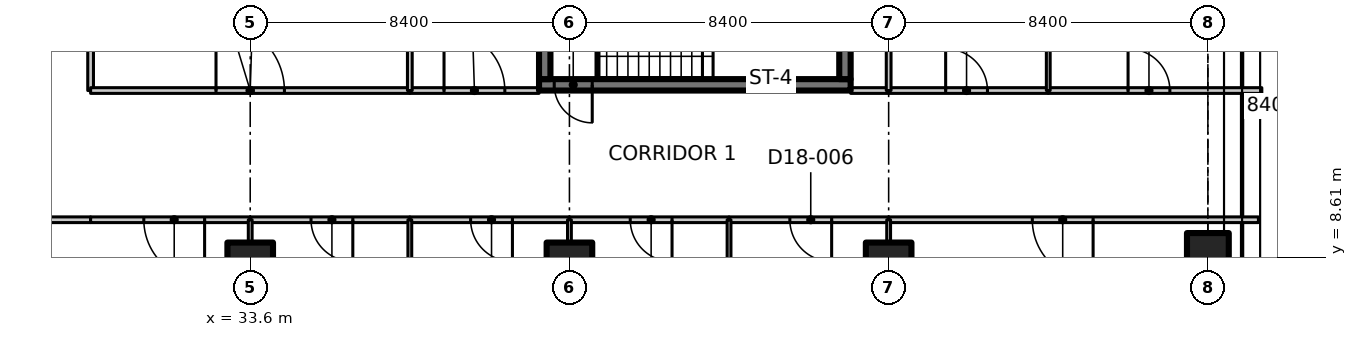
"""IFC4 building model, lengths in metres.
Left out: names, types, materials, properties, quantities, classifications, styles, units other than length and angle.
Written with IfcOpenShell. Run it as: python <this file> out.ifc"""

import sys

from ifc_helpers import new_model, si_unit, direction, frame, frame_2d, origin, origin_2d, place, context, subcontext, project, spatial, polyline, rectangle, outline, extrude, element, fill, save


model = new_model("IFC4")
c1 = context("Model", 3, precision=1e-05, world=origin(), true_north=direction((0.0, 1.0)))
c2 = subcontext(c1, "Body", "Model", "MODEL_VIEW")
j1 = project(units=[si_unit("LENGTHUNIT", "METRE"), si_unit("PLANEANGLEUNIT", "RADIAN")], contexts=[c1])
p1 = place(None, origin())
s1 = spatial("IfcSite", under=j1, at=p1, CompositionType="ELEMENT")
p2 = place(p1, origin())
s2 = spatial("IfcBuilding", under=s1, at=p2, CompositionType="ELEMENT")
p3 = place(p2, frame((0.0, 0.0, 145.7)))
s3 = spatial("IfcBuildingStorey", under=s2, at=p3, CompositionType="ELEMENT", Elevation=145.7)
for number, where, z_axis, x_axis in (
    (1, (33.6, 8.4, 0.0), (0.0, 0.0, 1.0), (1.0, 0.0, 0.0)),
    (2, (42.0, 8.4, 0.0), (0.0, 0.0, 1.0), (1.0, 0.0, 0.0)),
    (3, (50.4, 8.4, 0.0), (0.0, 0.0, 1.0), (1.0, 0.0, 0.0)),
):
    element("IfcColumn", number, at=place(p3, frame(where, z_axis=z_axis, x_axis=x_axis)), inside=s3, PredefinedType="COLUMN", context=c2, shape_type="SweptSolid", body=[
        extrude(rectangle(XDim=1.2, YDim=1.2, at=origin_2d()), origin(), (0.0, 0.0, 1.0), 3.35),
    ])
p4 = place(p3, frame((58.8, 8.4, 0.0), z_axis=(0.0, 0.0, 1.0), x_axis=(1.0, 0.0, 0.0)))
e4 = element("IfcColumn", 4, at=p4, inside=s3, PredefinedType="COLUMN", context=c2, shape_type="SweptSolid", body=[
    extrude(rectangle(XDim=1.1, YDim=1.7, at=origin_2d()), origin(), (0.0, 0.0, 1.0), 3.35),
])
p5 = place(p3, frame((49.4, 13.15, 0.0), z_axis=(0.0, 0.0, 1.0), x_axis=(-1.0, 0.0, 0.0)))
e5 = element("IfcWall", 5, at=p5, inside=s3, PredefinedType="SHEAR", context=c2, shape_type="SweptSolid", body=[
    extrude(rectangle(XDim=8.2, YDim=0.3, at=frame_2d((4.1, 0.0))), origin(), (0.0, 0.0, 1.0), 3.35),
])
p6 = place(p5, frame((6.8, 0.0, 0.0)))
e6 = element("IfcOpeningElement", 6, at=p6, cuts=e5, PredefinedType="OPENING", context=c2, shape_type="SweptSolid", body=[
    extrude(rectangle(XDim=1.0, YDim=2.1, at=frame_2d((0.5, 1.05))), frame((0.0, 0.16, 0.0), z_axis=(0.0, -1.0, 0.0), x_axis=(1.0, 0.0, 0.0)), (0.0, 0.0, 1.0), 0.32),
])
for number, where, z_axis, x_axis in (
    (7, (41.35, 13.3, 0.0), (0.0, 0.0, 1.0), (0.0, 1.0, 0.0)),
    (8, (49.25, 13.3, 0.0), (0.0, 0.0, 1.0), (0.0, 1.0, 0.0)),
):
    element("IfcWall", number, at=place(p3, frame(where, z_axis=z_axis, x_axis=x_axis)), inside=s3, PredefinedType="SHEAR", context=c2, shape_type="SweptSolid", body=[
        extrude(rectangle(XDim=2.55, YDim=0.3, at=frame_2d((1.275, 0.0))), origin(), (0.0, 0.0, 1.0), 3.35),
    ])
p7 = place(p3, frame((29.4, 9.6, 0.0), z_axis=(0.0, 0.0, 1.0), x_axis=(-1.0, 0.0, 0.0)))
e9 = element("IfcWall", 9, at=p7, inside=s3, PredefinedType="PARTITIONING", context=c2, shape_type="SweptSolid", body=[
    extrude(rectangle(XDim=4.2, YDim=0.15, at=frame_2d((2.1, 0.0))), origin(), (0.0, 0.0, 1.0), 3.33),
])
p8 = place(p3, frame((29.4, 21.2, 0.0), z_axis=(0.0, 0.0, 1.0), x_axis=(0.0, -1.0, 0.0)))
e10 = element("IfcWall", 10, at=p8, inside=s3, PredefinedType="PARTITIONING", context=c2, shape_type="SweptSolid", body=[
    extrude(rectangle(XDim=8.2, YDim=0.15, at=frame_2d((4.1, 0.0))), origin(), (0.0, 0.0, 1.0), 3.33),
])
p9 = place(p3, frame((33.6, 9.6, 0.0), z_axis=(0.0, 0.0, 1.0), x_axis=(-1.0, 0.0, 0.0)))
e11 = element("IfcWall", 11, at=p9, inside=s3, PredefinedType="PARTITIONING", context=c2, shape_type="SweptSolid", body=[
    extrude(rectangle(XDim=4.2, YDim=0.15, at=frame_2d((2.1, 0.0))), origin(), (0.0, 0.0, 1.0), 3.33),
])
p10 = place(p9, frame((1.2, 0.0, 0.0)))
e12 = element("IfcOpeningElement", 12, at=p10, cuts=e11, PredefinedType="OPENING", context=c2, shape_type="SweptSolid", body=[
    extrude(rectangle(XDim=1.6, YDim=2.1, at=frame_2d((0.8, 1.05))), frame((0.0, 0.085, 0.0), z_axis=(0.0, -1.0, 0.0), x_axis=(1.0, 0.0, 0.0)), (0.0, 0.0, 1.0), 0.17),
])
p11 = place(p3, frame((37.8, 9.6, 0.0), z_axis=(0.0, 0.0, 1.0), x_axis=(-1.0, 0.0, 0.0)))
e13 = element("IfcWall", 13, at=p11, inside=s3, PredefinedType="PARTITIONING", context=c2, shape_type="SweptSolid", body=[
    extrude(rectangle(XDim=4.2, YDim=0.15, at=frame_2d((2.1, 0.0))), origin(), (0.0, 0.0, 1.0), 3.33),
])
p12 = place(p11, frame((1.5, 0.0, 0.0)))
e14 = element("IfcOpeningElement", 14, at=p12, cuts=e13, PredefinedType="OPENING", context=c2, shape_type="SweptSolid", body=[
    extrude(rectangle(XDim=1.1, YDim=2.1, at=frame_2d((0.55, 1.05))), frame((0.0, 0.085, 0.0), z_axis=(0.0, -1.0, 0.0), x_axis=(1.0, 0.0, 0.0)), (0.0, 0.0, 1.0), 0.17),
])
p13 = place(p3, frame((42.0, 9.6, 0.0), z_axis=(0.0, 0.0, 1.0), x_axis=(-1.0, 0.0, 0.0)))
e15 = element("IfcWall", 15, at=p13, inside=s3, PredefinedType="PARTITIONING", context=c2, shape_type="SweptSolid", body=[
    extrude(rectangle(XDim=4.2, YDim=0.15, at=frame_2d((2.1, 0.0))), origin(), (0.0, 0.0, 1.0), 3.33),
])
p14 = place(p13, frame((1.5, 0.0, 0.0)))
e16 = element("IfcOpeningElement", 16, at=p14, cuts=e15, PredefinedType="OPENING", context=c2, shape_type="SweptSolid", body=[
    extrude(rectangle(XDim=1.1, YDim=2.1, at=frame_2d((0.55, 1.05))), frame((0.0, 0.085, 0.0), z_axis=(0.0, -1.0, 0.0), x_axis=(1.0, 0.0, 0.0)), (0.0, 0.0, 1.0), 0.17),
])
p15 = place(p3, frame((46.2, 9.6, 0.0), z_axis=(0.0, 0.0, 1.0), x_axis=(-1.0, 0.0, 0.0)))
e17 = element("IfcWall", 17, at=p15, inside=s3, PredefinedType="PARTITIONING", context=c2, shape_type="SweptSolid", body=[
    extrude(rectangle(XDim=4.2, YDim=0.15, at=frame_2d((2.1, 0.0))), origin(), (0.0, 0.0, 1.0), 3.33),
])
p16 = place(p15, frame((1.5, 0.0, 0.0)))
e18 = element("IfcOpeningElement", 18, at=p16, cuts=e17, PredefinedType="OPENING", context=c2, shape_type="SweptSolid", body=[
    extrude(rectangle(XDim=1.1, YDim=2.1, at=frame_2d((0.55, 1.05))), frame((0.0, 0.085, 0.0), z_axis=(0.0, -1.0, 0.0), x_axis=(1.0, 0.0, 0.0)), (0.0, 0.0, 1.0), 0.17),
])
p17 = place(p3, frame((50.4, 9.6, 0.0), z_axis=(0.0, 0.0, 1.0), x_axis=(-1.0, 0.0, 0.0)))
e19 = element("IfcWall", 19, at=p17, inside=s3, PredefinedType="PARTITIONING", context=c2, shape_type="SweptSolid", body=[
    extrude(rectangle(XDim=4.2, YDim=0.15, at=frame_2d((2.1, 0.0))), origin(), (0.0, 0.0, 1.0), 3.33),
])
p18 = place(p17, frame((1.5, 0.0, 0.0)))
e20 = element("IfcOpeningElement", 20, at=p18, cuts=e19, PredefinedType="OPENING", context=c2, shape_type="SweptSolid", body=[
    extrude(rectangle(XDim=1.1, YDim=2.1, at=frame_2d((0.55, 1.05))), frame((0.0, 0.085, 0.0), z_axis=(0.0, -1.0, 0.0), x_axis=(1.0, 0.0, 0.0)), (0.0, 0.0, 1.0), 0.17),
])
p19 = place(p3, frame((60.131, 9.6, 0.0), z_axis=(0.0, 0.0, 1.0), x_axis=(-1.0, 0.0, 0.0)))
e21 = element("IfcWall", 21, at=p19, inside=s3, PredefinedType="PARTITIONING", context=c2, shape_type="SweptSolid", body=[
    extrude(outline(polyline([(0.0, 0.0), (9.731, 0.0), (9.73, 3.33), (1.781, 3.33), (1.779, 2.98), (0.883, 2.98), (0.881, 3.33), (0.25, 3.33), (0.0, 3.33), (0.0, 0.0)])), frame((0.0, 0.075, 0.0), z_axis=(0.0, -1.0, 0.0), x_axis=(1.0, 0.0, 0.0)), (0.0, 0.0, 1.0), 0.15),
])
p20 = place(p19, frame((4.351, 0.0, 0.0)))
e22 = element("IfcOpeningElement", 22, at=p20, cuts=e21, PredefinedType="OPENING", context=c2, shape_type="SweptSolid", body=[
    extrude(rectangle(XDim=1.6, YDim=2.1, at=frame_2d((0.8, 1.05))), frame((0.0, 0.085, 0.0), z_axis=(0.0, -1.0, 0.0), x_axis=(1.0, 0.0, 0.0)), (0.0, 0.0, 1.0), 0.17),
])
p21 = place(p3, frame((29.4, 13.0, 0.0), z_axis=(0.0, 0.0, 1.0), x_axis=(1.0, 0.0, 0.0)))
e23 = element("IfcWall", 23, at=p21, inside=s3, PredefinedType="PARTITIONING", context=c2, shape_type="SweptSolid", body=[
    extrude(rectangle(XDim=8.4, YDim=0.15, at=frame_2d((4.2, 0.0))), origin(), (0.0, 0.0, 1.0), 3.33),
])
p22 = place(p21, frame((3.3, 0.0, 0.0)))
e24 = element("IfcOpeningElement", 24, at=p22, cuts=e23, PredefinedType="OPENING", context=c2, shape_type="SweptSolid", body=[
    extrude(rectangle(XDim=1.8, YDim=2.1, at=frame_2d((0.9, 1.05))), frame((0.0, 0.085, 0.0), z_axis=(0.0, -1.0, 0.0), x_axis=(1.0, 0.0, 0.0)), (0.0, 0.0, 1.0), 0.17),
])
p23 = place(p3, frame((37.8, 13.0, 0.0), z_axis=(0.0, 0.0, 1.0), x_axis=(1.0, 0.0, 0.0)))
e25 = element("IfcWall", 25, at=p23, inside=s3, PredefinedType="PARTITIONING", context=c2, shape_type="SweptSolid", body=[
    extrude(rectangle(XDim=3.4, YDim=0.15, at=frame_2d((1.7, 0.0))), origin(), (0.0, 0.0, 1.0), 3.33),
])
p24 = place(p23, frame((0.9, 0.0, 0.0)))
e26 = element("IfcOpeningElement", 26, at=p24, cuts=e25, PredefinedType="OPENING", context=c2, shape_type="SweptSolid", body=[
    extrude(rectangle(XDim=1.6, YDim=2.1, at=frame_2d((0.8, 1.05))), frame((0.0, 0.085, 0.0), z_axis=(0.0, -1.0, 0.0), x_axis=(1.0, 0.0, 0.0)), (0.0, 0.0, 1.0), 0.17),
])
p25 = place(p3, frame((49.4, 13.0, 0.0), z_axis=(0.0, 0.0, 1.0), x_axis=(1.0, 0.0, 0.0)))
e27 = element("IfcWall", 27, at=p25, inside=s3, PredefinedType="PARTITIONING", context=c2, shape_type="SweptSolid", body=[
    extrude(rectangle(XDim=1.0, YDim=0.15, at=frame_2d((0.5, 0.0))), origin(), (0.0, 0.0, 1.0), 3.33),
])
p26 = place(p3, frame((50.4, 13.0, 0.0), z_axis=(0.0, 0.0, 1.0), x_axis=(1.0, 0.0, 0.0)))
e28 = element("IfcWall", 28, at=p26, inside=s3, PredefinedType="PARTITIONING", context=c2, shape_type="SweptSolid", body=[
    extrude(rectangle(XDim=4.2, YDim=0.15, at=frame_2d((2.1, 0.0))), origin(), (0.0, 0.0, 1.0), 3.33),
])
p27 = place(p26, frame((1.5, 0.0, 0.0)))
e29 = element("IfcOpeningElement", 29, at=p27, cuts=e28, PredefinedType="OPENING", context=c2, shape_type="SweptSolid", body=[
    extrude(rectangle(XDim=1.1, YDim=2.1, at=frame_2d((0.55, 1.05))), frame((0.0, 0.085, 0.0), z_axis=(0.0, -1.0, 0.0), x_axis=(1.0, 0.0, 0.0)), (0.0, 0.0, 1.0), 0.17),
])
p28 = place(p3, frame((54.6, 13.0, 0.0), z_axis=(0.0, 0.0, 1.0), x_axis=(1.0, 0.0, 0.0)))
e30 = element("IfcWall", 30, at=p28, inside=s3, PredefinedType="PARTITIONING", context=c2, shape_type="SweptSolid", body=[
    extrude(outline(polyline([(0.0, 0.0), (5.619, 0.0), (5.619, 3.33), (5.28, 3.33), (4.65, 3.33), (4.648, 2.98), (3.752, 2.98), (3.75, 3.33), (0.0, 3.33), (0.0, 0.0)])), frame((0.0, 0.075, 0.0), z_axis=(0.0, -1.0, 0.0), x_axis=(1.0, 0.0, 0.0)), (0.0, 0.0, 1.0), 0.15),
])
p29 = place(p28, frame((2.1, 0.0, 0.0)))
e31 = element("IfcOpeningElement", 31, at=p29, cuts=e30, PredefinedType="OPENING", context=c2, shape_type="SweptSolid", body=[
    extrude(rectangle(XDim=1.1, YDim=2.1, at=frame_2d((0.55, 1.05))), frame((0.0, 0.085, 0.0), z_axis=(0.0, -1.0, 0.0), x_axis=(1.0, 0.0, 0.0)), (0.0, 0.0, 1.0), 0.17),
])
p30 = place(p3, frame((33.6, 9.6, 0.0), z_axis=(0.0, 0.0, 1.0), x_axis=(0.0, -1.0, 0.0)))
e32 = element("IfcWall", 32, at=p30, inside=s3, PredefinedType="PARTITIONING", context=c2, shape_type="SweptSolid", body=[
    extrude(rectangle(XDim=0.58, YDim=0.1, at=frame_2d((0.29, 0.0))), origin(), (0.0, 0.0, 1.0), 3.33),
])
p31 = place(p3, frame((37.8, 9.6, 0.0), z_axis=(0.0, 0.0, 1.0), x_axis=(0.0, -1.0, 0.0)))
e33 = element("IfcWall", 33, at=p31, inside=s3, PredefinedType="PARTITIONING", context=c2, shape_type="SweptSolid", body=[
    extrude(outline(polyline([(0.0, 0.0), (10.965, 0.0), (10.965, 3.33), (10.7, 3.33), (10.05, 3.33), (10.048, 2.98), (9.152, 2.98), (9.15, 3.33), (0.0, 3.33), (0.0, 0.0)])), frame((0.0, 0.05, 0.0), z_axis=(0.0, -1.0, 0.0), x_axis=(1.0, 0.0, 0.0)), (0.0, 0.0, 1.0), 0.1),
])
p32 = place(p3, frame((42.0, 9.6, 0.0), z_axis=(0.0, 0.0, 1.0), x_axis=(0.0, -1.0, 0.0)))
e34 = element("IfcWall", 34, at=p32, inside=s3, PredefinedType="PARTITIONING", context=c2, shape_type="SweptSolid", body=[
    extrude(rectangle(XDim=0.58, YDim=0.1, at=frame_2d((0.29, 0.0))), origin(), (0.0, 0.0, 1.0), 3.33),
])
p33 = place(p3, frame((46.2, 9.6, 0.0), z_axis=(0.0, 0.0, 1.0), x_axis=(0.0, -1.0, 0.0)))
e35 = element("IfcWall", 35, at=p33, inside=s3, PredefinedType="PARTITIONING", context=c2, shape_type="SweptSolid", body=[
    extrude(outline(polyline([(0.0, 0.0), (10.965, 0.0), (10.965, 3.33), (10.7, 3.33), (10.05, 3.33), (10.048, 2.98), (9.152, 2.98), (9.15, 3.33), (0.0, 3.33), (0.0, 0.0)])), frame((0.0, 0.05, 0.0), z_axis=(0.0, -1.0, 0.0), x_axis=(1.0, 0.0, 0.0)), (0.0, 0.0, 1.0), 0.1),
])
p34 = place(p3, frame((50.4, 9.6, 0.0), z_axis=(0.0, 0.0, 1.0), x_axis=(0.0, -1.0, 0.0)))
e36 = element("IfcWall", 36, at=p34, inside=s3, PredefinedType="PARTITIONING", context=c2, shape_type="SweptSolid", body=[
    extrude(rectangle(XDim=0.58, YDim=0.1, at=frame_2d((0.29, 0.0))), origin(), (0.0, 0.0, 1.0), 3.33),
])
p35 = place(p3, frame((37.8, 30.243, 0.0), z_axis=(0.0, 0.0, 1.0), x_axis=(0.0, -1.0, 0.0)))
e37 = element("IfcWall", 37, at=p35, inside=s3, PredefinedType="PARTITIONING", context=c2, shape_type="SweptSolid", body=[
    extrude(outline(polyline([(0.0, 0.0), (17.243, 0.0), (17.243, 3.33), (5.493, 3.33), (5.491, 2.98), (4.595, 2.98), (4.593, 3.33), (0.0, 3.33), (0.0, 0.0)])), frame((0.0, 0.062, 0.0), z_axis=(0.0, -1.0, 0.0), x_axis=(1.0, 0.0, 0.0)), (0.0, 0.0, 1.0), 0.125),
])
p36 = place(p3, frame((50.4, 16.18, 0.0), z_axis=(0.0, 0.0, 1.0), x_axis=(0.0, -1.0, 0.0)))
e38 = element("IfcWall", 38, at=p36, inside=s3, PredefinedType="PARTITIONING", context=c2, shape_type="SweptSolid", body=[
    extrude(rectangle(XDim=3.18, YDim=0.125, at=frame_2d((1.59, 0.0))), origin(), (0.0, 0.0, 1.0), 3.33),
])
p37 = place(p3, frame((54.6, 25.502, 0.0), z_axis=(0.0, 0.0, 1.0), x_axis=(0.0, -1.0, 0.0)))
e39 = element("IfcWall", 39, at=p37, inside=s3, PredefinedType="PARTITIONING", context=c2, shape_type="SweptSolid", body=[
    extrude(outline(polyline([(0.0, 0.0), (12.502, 0.0), (12.502, 3.33), (5.168, 3.33), (5.166, 2.98), (3.839, 2.98), (3.837, 3.33), (0.103, 3.33), (0.0, 3.33), (0.0, 0.0)])), frame((0.0, 0.05, 0.0), z_axis=(0.0, -1.0, 0.0), x_axis=(1.0, 0.0, 0.0)), (0.0, 0.0, 1.0), 0.1),
])
p38 = place(p6, origin())
e40 = element("IfcDoor", 40, at=p38, inside=s3, OperationType="SINGLE_SWING_LEFT", PredefinedType="DOOR", context=c2, shape_type="SweptSolid", body=[
    extrude(rectangle(XDim=1.0, YDim=2.1, at=frame_2d((0.5, 1.05))), frame((0.0, 0.025, 0.0), z_axis=(0.0, -1.0, 0.0), x_axis=(1.0, 0.0, 0.0)), (0.0, 0.0, 1.0), 0.05),
])
fill(e6, e40)
p39 = place(p10, origin())
e41 = element("IfcDoor", 41, at=p39, inside=s3, OperationType="DOUBLE_DOOR_SINGLE_SWING", PredefinedType="DOOR", context=c2, shape_type="SweptSolid", body=[
    extrude(rectangle(XDim=1.6, YDim=2.1, at=frame_2d((0.8, 1.05))), frame((0.0, 0.025, 0.0), z_axis=(0.0, -1.0, 0.0), x_axis=(1.0, 0.0, 0.0)), (0.0, 0.0, 1.0), 0.05),
])
fill(e12, e41)
p40 = place(p12, origin())
e42 = element("IfcDoor", 42, at=p40, inside=s3, OperationType="SINGLE_SWING_LEFT", PredefinedType="DOOR", context=c2, shape_type="SweptSolid", body=[
    extrude(rectangle(XDim=1.1, YDim=2.1, at=frame_2d((0.55, 1.05))), frame((0.0, 0.025, 0.0), z_axis=(0.0, -1.0, 0.0), x_axis=(1.0, 0.0, 0.0)), (0.0, 0.0, 1.0), 0.05),
])
fill(e14, e42)
p41 = place(p14, origin())
e43 = element("IfcDoor", 43, at=p41, inside=s3, OperationType="SINGLE_SWING_LEFT", PredefinedType="DOOR", context=c2, shape_type="SweptSolid", body=[
    extrude(rectangle(XDim=1.1, YDim=2.1, at=frame_2d((0.55, 1.05))), frame((0.0, 0.025, 0.0), z_axis=(0.0, -1.0, 0.0), x_axis=(1.0, 0.0, 0.0)), (0.0, 0.0, 1.0), 0.05),
])
fill(e16, e43)
p42 = place(p16, origin())
e44 = element("IfcDoor", 44, at=p42, inside=s3, OperationType="SINGLE_SWING_LEFT", PredefinedType="DOOR", context=c2, shape_type="SweptSolid", body=[
    extrude(rectangle(XDim=1.1, YDim=2.1, at=frame_2d((0.55, 1.05))), frame((0.0, 0.025, 0.0), z_axis=(0.0, -1.0, 0.0), x_axis=(1.0, 0.0, 0.0)), (0.0, 0.0, 1.0), 0.05),
])
fill(e18, e44)
p43 = place(p18, origin())
e45 = element("IfcDoor", 45, at=p43, inside=s3, OperationType="SINGLE_SWING_LEFT", PredefinedType="DOOR", context=c2, shape_type="SweptSolid", body=[
    extrude(rectangle(XDim=1.1, YDim=2.1, at=frame_2d((0.55, 1.05))), frame((0.0, 0.025, 0.0), z_axis=(0.0, -1.0, 0.0), x_axis=(1.0, 0.0, 0.0)), (0.0, 0.0, 1.0), 0.05),
])
fill(e20, e45)
p44 = place(p20, origin())
e46 = element("IfcDoor", 46, at=p44, inside=s3, OperationType="DOUBLE_DOOR_SINGLE_SWING", PredefinedType="DOOR", context=c2, shape_type="SweptSolid", body=[
    extrude(rectangle(XDim=1.6, YDim=2.1, at=frame_2d((0.8, 1.05))), frame((0.0, 0.025, 0.0), z_axis=(0.0, -1.0, 0.0), x_axis=(1.0, 0.0, 0.0)), (0.0, 0.0, 1.0), 0.05),
])
fill(e22, e46)
p45 = place(p22, origin())
e47 = element("IfcDoor", 47, at=p45, inside=s3, OperationType="DOUBLE_DOOR_SINGLE_SWING", PredefinedType="DOOR", context=c2, shape_type="SweptSolid", body=[
    extrude(rectangle(XDim=1.8, YDim=2.1, at=frame_2d((0.9, 1.05))), frame((0.0, 0.025, 0.0), z_axis=(0.0, -1.0, 0.0), x_axis=(1.0, 0.0, 0.0)), (0.0, 0.0, 1.0), 0.05),
])
fill(e24, e47)
p46 = place(p24, origin())
e48 = element("IfcDoor", 48, at=p46, inside=s3, OperationType="DOUBLE_DOOR_SINGLE_SWING", PredefinedType="DOOR", context=c2, shape_type="SweptSolid", body=[
    extrude(rectangle(XDim=1.6, YDim=2.1, at=frame_2d((0.8, 1.05))), frame((0.0, 0.025, 0.0), z_axis=(0.0, -1.0, 0.0), x_axis=(1.0, 0.0, 0.0)), (0.0, 0.0, 1.0), 0.05),
])
fill(e26, e48)
p47 = place(p27, origin())
e49 = element("IfcDoor", 49, at=p47, inside=s3, OperationType="SINGLE_SWING_LEFT", PredefinedType="DOOR", context=c2, shape_type="SweptSolid", body=[
    extrude(rectangle(XDim=1.1, YDim=2.1, at=frame_2d((0.55, 1.05))), frame((0.0, 0.025, 0.0), z_axis=(0.0, -1.0, 0.0), x_axis=(1.0, 0.0, 0.0)), (0.0, 0.0, 1.0), 0.05),
])
fill(e29, e49)
p48 = place(p29, origin())
e50 = element("IfcDoor", 50, at=p48, inside=s3, OperationType="SINGLE_SWING_LEFT", PredefinedType="DOOR", context=c2, shape_type="SweptSolid", body=[
    extrude(rectangle(XDim=1.1, YDim=2.1, at=frame_2d((0.55, 1.05))), frame((0.0, 0.025, 0.0), z_axis=(0.0, -1.0, 0.0), x_axis=(1.0, 0.0, 0.0)), (0.0, 0.0, 1.0), 0.05),
])
fill(e31, e50)
save(model, sys.argv[1])
